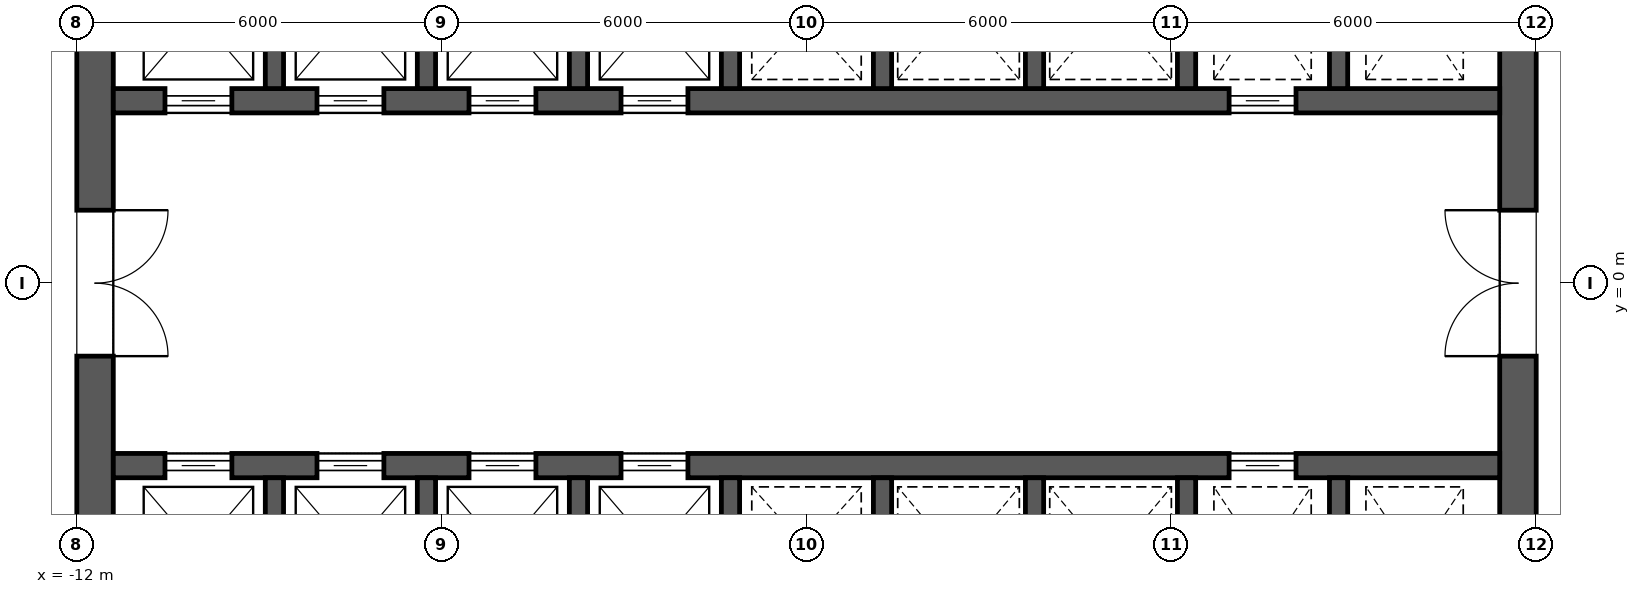
"""IFC4 building model, lengths in metres.
Left out: names, types, materials, properties, quantities, classifications, styles, units other than length and angle.
Written with IfcOpenShell. Run it as: python <this file> out.ifc"""

import sys

from ifc_helpers import new_model, si_unit, direction, frame, frame_2d, origin, place, context, subcontext, project, spatial, rectangle, extrude, element, fill, save


model = new_model("IFC4")
c1 = context("Model", 3, precision=1e-05, world=origin(), true_north=direction((0.0, 1.0)))
c2 = subcontext(c1, "Body", "Model", "MODEL_VIEW")
j1 = project(units=[si_unit("LENGTHUNIT", "METRE"), si_unit("PLANEANGLEUNIT", "RADIAN")], contexts=[c1])
p1 = place(None, origin())
s1 = spatial("IfcSite", under=j1, at=p1, CompositionType="ELEMENT")
p2 = place(p1, origin())
s2 = spatial("IfcBuilding", under=s1, at=p2, CompositionType="ELEMENT")
p3 = place(p2, frame((0.0, 0.0, 86.5)))
s3 = spatial("IfcBuildingStorey", under=s2, at=p3, CompositionType="ELEMENT", Elevation=86.5)
p4 = place(p3, frame((11.7, -11.4, 0.0), z_axis=(0.0, 0.0, 1.0), x_axis=(0.0, 1.0, 0.0)))
e1 = element("IfcWall", 1, at=p4, inside=s3, PredefinedType="SHEAR", context=c2, shape_type="SweptSolid", body=[
    extrude(rectangle(XDim=22.8, YDim=0.6, at=frame_2d((11.4, 0.0))), origin(), (0.0, 0.0, 1.0), 4.2),
])
p5 = place(p4, frame((10.2, 0.0, 0.0)))
e2 = element("IfcOpeningElement", 2, at=p5, cuts=e1, PredefinedType="OPENING", context=c2, shape_type="SweptSolid", body=[
    extrude(rectangle(XDim=2.4, YDim=2.1, at=frame_2d((1.2, 1.05))), frame((0.0, 0.312, 0.0), z_axis=(0.0, -1.0, 0.0), x_axis=(1.0, 0.0, 0.0)), (0.0, 0.0, 1.0), 0.624),
])
p6 = place(p4, frame((19.5, 0.0, 0.0)))
e3 = element("IfcOpeningElement", 3, at=p6, cuts=e1, PredefinedType="OPENING", context=c2, shape_type="SweptSolid", body=[
    extrude(rectangle(XDim=1.2, YDim=2.1, at=frame_2d((0.6, 1.05))), frame((0.0, 0.312, 0.0), z_axis=(0.0, -1.0, 0.0), x_axis=(1.0, 0.0, 0.0)), (0.0, 0.0, 1.0), 0.624),
])
p7 = place(p4, frame((2.1, 0.0, 0.0)))
e4 = element("IfcOpeningElement", 4, at=p7, cuts=e1, PredefinedType="OPENING", context=c2, shape_type="SweptSolid", body=[
    extrude(rectangle(XDim=1.2, YDim=2.1, at=frame_2d((0.6, 1.05))), frame((0.0, 0.312, 0.0), z_axis=(0.0, -1.0, 0.0), x_axis=(1.0, 0.0, 0.0)), (0.0, 0.0, 1.0), 0.624),
])
p8 = place(p3, frame((-11.7, -11.4, 0.0), z_axis=(0.0, 0.0, 1.0), x_axis=(0.0, 1.0, 0.0)))
e5 = element("IfcWall", 5, at=p8, inside=s3, PredefinedType="SHEAR", context=c2, shape_type="SweptSolid", body=[
    extrude(rectangle(XDim=22.8, YDim=0.6, at=frame_2d((11.4, 0.0))), origin(), (0.0, 0.0, 1.0), 4.2),
])
p9 = place(p8, frame((10.2, 0.0, 0.0)))
e6 = element("IfcOpeningElement", 6, at=p9, cuts=e5, PredefinedType="OPENING", context=c2, shape_type="SweptSolid", body=[
    extrude(rectangle(XDim=2.4, YDim=2.1, at=frame_2d((1.2, 1.05))), frame((0.0, 0.312, 0.0), z_axis=(0.0, -1.0, 0.0), x_axis=(1.0, 0.0, 0.0)), (0.0, 0.0, 1.0), 0.624),
])
p10 = place(p8, frame((18.925, 0.0, 0.0)))
e7 = element("IfcOpeningElement", 7, at=p10, cuts=e5, PredefinedType="OPENING", context=c2, shape_type="SweptSolid", body=[
    extrude(rectangle(XDim=1.2, YDim=2.1, at=frame_2d((0.6, 1.05))), frame((0.0, 0.312, 0.0), z_axis=(0.0, -1.0, 0.0), x_axis=(1.0, 0.0, 0.0)), (0.0, 0.0, 1.0), 0.624),
])
p11 = place(p8, frame((2.675, 0.0, 0.0)))
e8 = element("IfcOpeningElement", 8, at=p11, cuts=e5, PredefinedType="OPENING", context=c2, shape_type="SweptSolid", body=[
    extrude(rectangle(XDim=1.2, YDim=2.1, at=frame_2d((0.6, 1.05))), frame((0.0, 0.312, 0.0), z_axis=(0.0, -1.0, 0.0), x_axis=(1.0, 0.0, 0.0)), (0.0, 0.0, 1.0), 0.624),
])
p12 = place(p3, frame((-11.4, 3.0, 0.0), z_axis=(0.0, 0.0, 1.0), x_axis=(1.0, 0.0, 0.0)))
e9 = element("IfcWall", 9, at=p12, inside=s3, PredefinedType="SHEAR", context=c2, shape_type="SweptSolid", body=[
    extrude(rectangle(XDim=22.8, YDim=0.4, at=frame_2d((11.4, 0.0))), origin(), (0.0, 0.0, 1.0), 4.2),
])
p13 = place(p12, frame((0.85, 0.0, 0.0)))
e10 = element("IfcOpeningElement", 10, at=p13, cuts=e9, PredefinedType="OPENING", context=c2, shape_type="SweptSolid", body=[
    extrude(rectangle(XDim=1.1, YDim=2.1, at=frame_2d((0.55, 1.05))), frame((0.0, 0.212, 0.0), z_axis=(0.0, -1.0, 0.0), x_axis=(1.0, 0.0, 0.0)), (0.0, 0.0, 1.0), 0.424),
])
p14 = place(p12, frame((3.35, 0.0, 0.0)))
e11 = element("IfcOpeningElement", 11, at=p14, cuts=e9, PredefinedType="OPENING", context=c2, shape_type="SweptSolid", body=[
    extrude(rectangle(XDim=1.1, YDim=2.1, at=frame_2d((0.55, 1.05))), frame((0.0, 0.212, 0.0), z_axis=(0.0, -1.0, 0.0), x_axis=(1.0, 0.0, 0.0)), (0.0, 0.0, 1.0), 0.424),
])
p15 = place(p12, frame((5.85, 0.0, 0.0)))
e12 = element("IfcOpeningElement", 12, at=p15, cuts=e9, PredefinedType="OPENING", context=c2, shape_type="SweptSolid", body=[
    extrude(rectangle(XDim=1.1, YDim=2.1, at=frame_2d((0.55, 1.05))), frame((0.0, 0.212, 0.0), z_axis=(0.0, -1.0, 0.0), x_axis=(1.0, 0.0, 0.0)), (0.0, 0.0, 1.0), 0.424),
])
p16 = place(p12, frame((8.35, 0.0, 0.0)))
e13 = element("IfcOpeningElement", 13, at=p16, cuts=e9, PredefinedType="OPENING", context=c2, shape_type="SweptSolid", body=[
    extrude(rectangle(XDim=1.1, YDim=2.1, at=frame_2d((0.55, 1.05))), frame((0.0, 0.212, 0.0), z_axis=(0.0, -1.0, 0.0), x_axis=(1.0, 0.0, 0.0)), (0.0, 0.0, 1.0), 0.424),
])
p17 = place(p12, frame((18.35, 0.0, 0.0)))
e14 = element("IfcOpeningElement", 14, at=p17, cuts=e9, PredefinedType="OPENING", context=c2, shape_type="SweptSolid", body=[
    extrude(rectangle(XDim=1.1, YDim=2.1, at=frame_2d((0.55, 1.05))), frame((0.0, 0.212, 0.0), z_axis=(0.0, -1.0, 0.0), x_axis=(1.0, 0.0, 0.0)), (0.0, 0.0, 1.0), 0.424),
])
for number, where, z_axis, x_axis in (
    (15, (-8.75, 3.2, 0.0), (0.0, 0.0, 1.0), (0.0, 1.0, 0.0)),
    (16, (-6.25, 3.2, 0.0), (0.0, 0.0, 1.0), (0.0, 1.0, 0.0)),
    (17, (-3.75, 3.2, 0.0), (0.0, 0.0, 1.0), (0.0, 1.0, 0.0)),
    (18, (-1.25, 3.2, 0.0), (0.0, 0.0, 1.0), (0.0, 1.0, 0.0)),
    (19, (1.25, 3.2, 0.0), (0.0, 0.0, 1.0), (0.0, 1.0, 0.0)),
    (20, (3.75, 3.2, 0.0), (0.0, 0.0, 1.0), (0.0, 1.0, 0.0)),
    (21, (6.25, 3.2, 0.0), (0.0, 0.0, 1.0), (0.0, 1.0, 0.0)),
    (22, (8.75, 3.2, 0.0), (0.0, 0.0, 1.0), (0.0, 1.0, 0.0)),
):
    element("IfcWall", number, at=place(p3, frame(where, z_axis=z_axis, x_axis=x_axis)), inside=s3, PredefinedType="SHEAR", context=c2, shape_type="SweptSolid", body=[
        extrude(rectangle(XDim=2.9, YDim=0.3, at=frame_2d((1.45, 0.0))), origin(), (0.0, 0.0, 1.0), 4.2),
    ])
p18 = place(p3, frame((-11.4, -3.0, 0.0), z_axis=(0.0, 0.0, 1.0), x_axis=(1.0, 0.0, 0.0)))
e23 = element("IfcWall", 23, at=p18, inside=s3, PredefinedType="SHEAR", context=c2, shape_type="SweptSolid", body=[
    extrude(rectangle(XDim=22.8, YDim=0.4, at=frame_2d((11.4, 0.0))), origin(), (0.0, 0.0, 1.0), 4.2),
])
p19 = place(p18, frame((0.85, 0.0, 0.0)))
e24 = element("IfcOpeningElement", 24, at=p19, cuts=e23, PredefinedType="OPENING", context=c2, shape_type="SweptSolid", body=[
    extrude(rectangle(XDim=1.1, YDim=2.1, at=frame_2d((0.55, 1.05))), frame((0.0, 0.212, 0.0), z_axis=(0.0, -1.0, 0.0), x_axis=(1.0, 0.0, 0.0)), (0.0, 0.0, 1.0), 0.424),
])
p20 = place(p18, frame((3.35, 0.0, 0.0)))
e25 = element("IfcOpeningElement", 25, at=p20, cuts=e23, PredefinedType="OPENING", context=c2, shape_type="SweptSolid", body=[
    extrude(rectangle(XDim=1.1, YDim=2.1, at=frame_2d((0.55, 1.05))), frame((0.0, 0.212, 0.0), z_axis=(0.0, -1.0, 0.0), x_axis=(1.0, 0.0, 0.0)), (0.0, 0.0, 1.0), 0.424),
])
p21 = place(p18, frame((5.85, 0.0, 0.0)))
e26 = element("IfcOpeningElement", 26, at=p21, cuts=e23, PredefinedType="OPENING", context=c2, shape_type="SweptSolid", body=[
    extrude(rectangle(XDim=1.1, YDim=2.1, at=frame_2d((0.55, 1.05))), frame((0.0, 0.212, 0.0), z_axis=(0.0, -1.0, 0.0), x_axis=(1.0, 0.0, 0.0)), (0.0, 0.0, 1.0), 0.424),
])
p22 = place(p18, frame((8.35, 0.0, 0.0)))
e27 = element("IfcOpeningElement", 27, at=p22, cuts=e23, PredefinedType="OPENING", context=c2, shape_type="SweptSolid", body=[
    extrude(rectangle(XDim=1.1, YDim=2.1, at=frame_2d((0.55, 1.05))), frame((0.0, 0.212, 0.0), z_axis=(0.0, -1.0, 0.0), x_axis=(1.0, 0.0, 0.0)), (0.0, 0.0, 1.0), 0.424),
])
p23 = place(p18, frame((18.35, 0.0, 0.0)))
e28 = element("IfcOpeningElement", 28, at=p23, cuts=e23, PredefinedType="OPENING", context=c2, shape_type="SweptSolid", body=[
    extrude(rectangle(XDim=1.1, YDim=2.1, at=frame_2d((0.55, 1.05))), frame((0.0, 0.212, 0.0), z_axis=(0.0, -1.0, 0.0), x_axis=(1.0, 0.0, 0.0)), (0.0, 0.0, 1.0), 0.424),
])
for number, where, z_axis, x_axis in (
    (29, (-8.75, -6.1, 0.0), (0.0, 0.0, 1.0), (0.0, 1.0, 0.0)),
    (30, (-6.25, -6.1, 0.0), (0.0, 0.0, 1.0), (0.0, 1.0, 0.0)),
    (31, (-3.75, -6.1, 0.0), (0.0, 0.0, 1.0), (0.0, 1.0, 0.0)),
    (32, (-1.25, -6.1, 0.0), (0.0, 0.0, 1.0), (0.0, 1.0, 0.0)),
    (33, (1.25, -6.1, 0.0), (0.0, 0.0, 1.0), (0.0, 1.0, 0.0)),
    (34, (3.75, -6.1, 0.0), (0.0, 0.0, 1.0), (0.0, 1.0, 0.0)),
    (35, (6.25, -6.1, 0.0), (0.0, 0.0, 1.0), (0.0, 1.0, 0.0)),
    (36, (8.75, -6.1, 0.0), (0.0, 0.0, 1.0), (0.0, 1.0, 0.0)),
):
    element("IfcWall", number, at=place(p3, frame(where, z_axis=z_axis, x_axis=x_axis)), inside=s3, PredefinedType="SHEAR", context=c2, shape_type="SweptSolid", body=[
        extrude(rectangle(XDim=2.9, YDim=0.3, at=frame_2d((1.45, 0.0))), origin(), (0.0, 0.0, 1.0), 4.2),
    ])
p24 = place(p13, origin())
e37 = element("IfcDoor", 37, at=p24, inside=s3, OperationType="SLIDING_TO_LEFT", PredefinedType="DOOR", context=c2, shape_type="SweptSolid", body=[
    extrude(rectangle(XDim=1.1, YDim=2.1, at=frame_2d((0.55, 1.05))), frame((0.0, 0.025, 0.0), z_axis=(0.0, -1.0, 0.0), x_axis=(1.0, 0.0, 0.0)), (0.0, 0.0, 1.0), 0.05),
])
fill(e10, e37)
p25 = place(p14, origin())
e38 = element("IfcDoor", 38, at=p25, inside=s3, OperationType="SLIDING_TO_LEFT", PredefinedType="DOOR", context=c2, shape_type="SweptSolid", body=[
    extrude(rectangle(XDim=1.1, YDim=2.1, at=frame_2d((0.55, 1.05))), frame((0.0, 0.025, 0.0), z_axis=(0.0, -1.0, 0.0), x_axis=(1.0, 0.0, 0.0)), (0.0, 0.0, 1.0), 0.05),
])
fill(e11, e38)
p26 = place(p15, origin())
e39 = element("IfcDoor", 39, at=p26, inside=s3, OperationType="SLIDING_TO_LEFT", PredefinedType="DOOR", context=c2, shape_type="SweptSolid", body=[
    extrude(rectangle(XDim=1.1, YDim=2.1, at=frame_2d((0.55, 1.05))), frame((0.0, 0.025, 0.0), z_axis=(0.0, -1.0, 0.0), x_axis=(1.0, 0.0, 0.0)), (0.0, 0.0, 1.0), 0.05),
])
fill(e12, e39)
p27 = place(p16, origin())
e40 = element("IfcDoor", 40, at=p27, inside=s3, OperationType="SLIDING_TO_LEFT", PredefinedType="DOOR", context=c2, shape_type="SweptSolid", body=[
    extrude(rectangle(XDim=1.1, YDim=2.1, at=frame_2d((0.55, 1.05))), frame((0.0, 0.025, 0.0), z_axis=(0.0, -1.0, 0.0), x_axis=(1.0, 0.0, 0.0)), (0.0, 0.0, 1.0), 0.05),
])
fill(e13, e40)
p28 = place(p19, origin())
e41 = element("IfcDoor", 41, at=p28, inside=s3, OperationType="SLIDING_TO_LEFT", PredefinedType="DOOR", context=c2, shape_type="SweptSolid", body=[
    extrude(rectangle(XDim=1.1, YDim=2.1, at=frame_2d((0.55, 1.05))), frame((0.0, 0.025, 0.0), z_axis=(0.0, -1.0, 0.0), x_axis=(1.0, 0.0, 0.0)), (0.0, 0.0, 1.0), 0.05),
])
fill(e24, e41)
p29 = place(p20, origin())
e42 = element("IfcDoor", 42, at=p29, inside=s3, OperationType="SLIDING_TO_LEFT", PredefinedType="DOOR", context=c2, shape_type="SweptSolid", body=[
    extrude(rectangle(XDim=1.1, YDim=2.1, at=frame_2d((0.55, 1.05))), frame((0.0, 0.025, 0.0), z_axis=(0.0, -1.0, 0.0), x_axis=(1.0, 0.0, 0.0)), (0.0, 0.0, 1.0), 0.05),
])
fill(e25, e42)
p30 = place(p21, origin())
e43 = element("IfcDoor", 43, at=p30, inside=s3, OperationType="SLIDING_TO_LEFT", PredefinedType="DOOR", context=c2, shape_type="SweptSolid", body=[
    extrude(rectangle(XDim=1.1, YDim=2.1, at=frame_2d((0.55, 1.05))), frame((0.0, 0.025, 0.0), z_axis=(0.0, -1.0, 0.0), x_axis=(1.0, 0.0, 0.0)), (0.0, 0.0, 1.0), 0.05),
])
fill(e26, e43)
p31 = place(p22, origin())
e44 = element("IfcDoor", 44, at=p31, inside=s3, OperationType="SLIDING_TO_LEFT", PredefinedType="DOOR", context=c2, shape_type="SweptSolid", body=[
    extrude(rectangle(XDim=1.1, YDim=2.1, at=frame_2d((0.55, 1.05))), frame((0.0, 0.025, 0.0), z_axis=(0.0, -1.0, 0.0), x_axis=(1.0, 0.0, 0.0)), (0.0, 0.0, 1.0), 0.05),
])
fill(e27, e44)
p32 = place(p17, origin())
e45 = element("IfcDoor", 45, at=p32, inside=s3, OperationType="SLIDING_TO_LEFT", PredefinedType="DOOR", context=c2, shape_type="SweptSolid", body=[
    extrude(rectangle(XDim=1.1, YDim=2.1, at=frame_2d((0.55, 1.05))), frame((0.0, 0.025, 0.0), z_axis=(0.0, -1.0, 0.0), x_axis=(1.0, 0.0, 0.0)), (0.0, 0.0, 1.0), 0.05),
])
fill(e14, e45)
p33 = place(p23, origin())
e46 = element("IfcDoor", 46, at=p33, inside=s3, OperationType="SLIDING_TO_LEFT", PredefinedType="DOOR", context=c2, shape_type="SweptSolid", body=[
    extrude(rectangle(XDim=1.1, YDim=2.1, at=frame_2d((0.55, 1.05))), frame((0.0, 0.025, 0.0), z_axis=(0.0, -1.0, 0.0), x_axis=(1.0, 0.0, 0.0)), (0.0, 0.0, 1.0), 0.05),
])
fill(e28, e46)
p34 = place(p9, frame((2.4, 0.0, 0.0), z_axis=(0.0, 0.0, 1.0), x_axis=(-1.0, 0.0, 0.0)))
e47 = element("IfcDoor", 47, at=p34, inside=s3, OperationType="DOUBLE_DOOR_SINGLE_SWING", PredefinedType="DOOR", context=c2, shape_type="SweptSolid", body=[
    extrude(rectangle(XDim=2.4, YDim=2.1, at=frame_2d((1.2, 1.05))), frame((0.0, 0.025, 0.0), z_axis=(0.0, -1.0, 0.0), x_axis=(1.0, 0.0, 0.0)), (0.0, 0.0, 1.0), 0.05),
])
fill(e6, e47)
p35 = place(p5, origin())
e48 = element("IfcDoor", 48, at=p35, inside=s3, OperationType="DOUBLE_DOOR_SINGLE_SWING", PredefinedType="DOOR", context=c2, shape_type="SweptSolid", body=[
    extrude(rectangle(XDim=2.4, YDim=2.1, at=frame_2d((1.2, 1.05))), frame((0.0, 0.025, 0.0), z_axis=(0.0, -1.0, 0.0), x_axis=(1.0, 0.0, 0.0)), (0.0, 0.0, 1.0), 0.05),
])
fill(e2, e48)
save(model, sys.argv[1])
